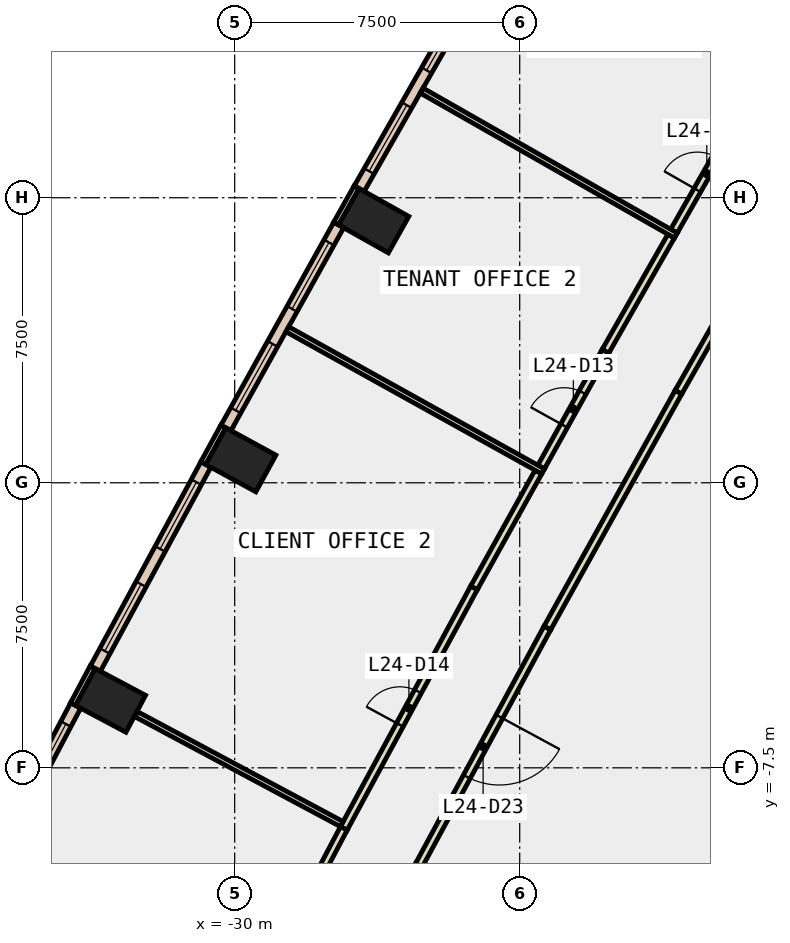
"""IFC4 building model, lengths in metres.
Left out: names, types, materials, properties, quantities, classifications, styles, units other than length and angle.
Written with IfcOpenShell. Run it as: python <this file> out.ifc"""

import sys

from ifc_helpers import new_model, si_unit, direction, frame, frame_2d, origin, origin_2d, place, context, subcontext, project, spatial, rectangle, extrude, element, fill, save


model = new_model("IFC4")
c1 = context("Model", 3, precision=1e-05, world=origin(), true_north=direction((0.0, 1.0)))
c2 = subcontext(c1, "Body", "Model", "MODEL_VIEW")
j1 = project(units=[si_unit("LENGTHUNIT", "METRE"), si_unit("PLANEANGLEUNIT", "RADIAN")], contexts=[c1])
p1 = place(None, origin())
s1 = spatial("IfcSite", under=j1, at=p1, CompositionType="ELEMENT")
p2 = place(p1, origin())
s2 = spatial("IfcBuilding", under=s1, at=p2, CompositionType="ELEMENT")
p3 = place(p2, frame((0.0, 0.0, 111.8)))
s3 = spatial("IfcBuildingStorey", under=s2, at=p3, CompositionType="ELEMENT", Elevation=111.8)
for number, where, z_axis, x_axis in (
    (1, (-26.341, 6.896, -0.4), (0.0, 0.0, 1.0), (0.49, 0.872, 0.0)),
    (2, (-29.838, 0.604, -0.4), (0.0, 0.0, 1.0), (0.48, 0.877, 0.0)),
    (3, (-33.266, -5.726, -0.4), (0.0, 0.0, 1.0), (0.469, 0.883, 0.0)),
):
    element("IfcColumn", number, at=place(p3, frame(where, z_axis=z_axis, x_axis=x_axis)), inside=s3, PredefinedType="COLUMN", context=c2, shape_type="SweptSolid", body=[
        extrude(rectangle(XDim=1.1, YDim=1.5, at=origin_2d()), origin(), (0.0, 0.0, 1.0), 4.2),
    ])
p4 = place(p3, frame((-26.791, 7.78, 0.0), z_axis=(0.0, 0.0, 1.0), x_axis=(-0.490008344094, -0.871717742574, 0.0)))
e4 = element("IfcWall", 4, at=p4, inside=s3, PredefinedType="STANDARD", context=c2, shape_type="SweptSolid", body=[
    extrude(rectangle(XDim=1.1, YDim=0.15, at=frame_2d((0.55, 0.0))), origin(), (0.0, 0.0, 1.0), 3.8),
])
p5 = place(p3, frame((-30.298, 1.483, 0.0), z_axis=(0.0, 0.0, 1.0), x_axis=(-0.479566870346, -0.877505337229, 0.0)))
e5 = element("IfcWall", 5, at=p5, inside=s3, PredefinedType="STANDARD", context=c2, shape_type="SweptSolid", body=[
    extrude(rectangle(XDim=1.101, YDim=0.15, at=frame_2d((0.55, 0.0))), origin(), (0.0, 0.0, 1.0), 3.8),
])
p6 = place(p3, frame((-33.737, -4.854, 0.0), z_axis=(0.0, 0.0, 1.0), x_axis=(-0.46919310775, -0.883095593716, 0.0)))
e6 = element("IfcWall", 6, at=p6, inside=s3, PredefinedType="STANDARD", context=c2, shape_type="SweptSolid", body=[
    extrude(rectangle(XDim=1.099, YDim=0.15, at=frame_2d((0.55, 0.0))), origin(), (0.0, 0.0, 1.0), 3.8),
])
p7 = place(p3, frame((-23.698, 13.048, 0.0), z_axis=(0.0, 0.0, 1.0), x_axis=(-0.495114366991, -0.868827810098, 0.0)))
e7 = element("IfcWall", 7, at=p7, inside=s3, PredefinedType="STANDARD", context=c2, shape_type="SweptSolid", body=[
    extrude(rectangle(XDim=6.11, YDim=0.3, at=frame_2d((3.055, 0.0))), origin(), (0.0, 0.0, 1.0), 3.8),
])
p8 = place(p7, frame((0.527, 0.0, 0.9)))
e8 = element("IfcOpeningElement", 8, at=p8, cuts=e7, PredefinedType="OPENING", context=c2, shape_type="SweptSolid", body=[
    extrude(rectangle(XDim=2.0, YDim=2.6, at=frame_2d((1.0, 1.3))), frame((0.0, 0.16, 0.0), z_axis=(0.0, -1.0, 0.0), x_axis=(1.0, 0.0, 0.0)), (0.0, 0.0, 1.0), 0.32),
])
p9 = place(p7, frame((3.582, 0.0, 0.9)))
e9 = element("IfcOpeningElement", 9, at=p9, cuts=e7, PredefinedType="OPENING", context=c2, shape_type="SweptSolid", body=[
    extrude(rectangle(XDim=2.0, YDim=2.6, at=frame_2d((1.0, 1.3))), frame((0.0, 0.16, 0.0), z_axis=(0.0, -1.0, 0.0), x_axis=(1.0, 0.0, 0.0)), (0.0, 0.0, 1.0), 0.32),
])
p10 = place(p3, frame((-27.262, 6.784, 0.0), z_axis=(0.0, 0.0, 1.0), x_axis=(-0.485822751649, -0.874057351654, 0.0)))
e10 = element("IfcWall", 10, at=p10, inside=s3, PredefinedType="STANDARD", context=c2, shape_type="SweptSolid", body=[
    extrude(rectangle(XDim=6.109, YDim=0.3, at=frame_2d((3.055, 0.0))), origin(), (0.0, 0.0, 1.0), 3.8),
])
p11 = place(p10, frame((0.527, 0.0, 0.9)))
e11 = element("IfcOpeningElement", 11, at=p11, cuts=e10, PredefinedType="OPENING", context=c2, shape_type="SweptSolid", body=[
    extrude(rectangle(XDim=2.0, YDim=2.6, at=frame_2d((1.0, 1.3))), frame((0.0, 0.16, 0.0), z_axis=(0.0, -1.0, 0.0), x_axis=(1.0, 0.0, 0.0)), (0.0, 0.0, 1.0), 0.32),
])
p12 = place(p10, frame((3.582, 0.0, 0.9)))
e12 = element("IfcOpeningElement", 12, at=p12, cuts=e10, PredefinedType="OPENING", context=c2, shape_type="SweptSolid", body=[
    extrude(rectangle(XDim=2.0, YDim=2.6, at=frame_2d((1.0, 1.3))), frame((0.0, 0.16, 0.0), z_axis=(0.0, -1.0, 0.0), x_axis=(1.0, 0.0, 0.0)), (0.0, 0.0, 1.0), 0.32),
])
p13 = place(p3, frame((-30.758, 0.481, 0.0), z_axis=(0.0, 0.0, 1.0), x_axis=(-0.476097776444, -0.879392351152, 0.0)))
e13 = element("IfcWall", 13, at=p13, inside=s3, PredefinedType="STANDARD", context=c2, shape_type="SweptSolid", body=[
    extrude(rectangle(XDim=6.11, YDim=0.3, at=frame_2d((3.055, 0.0))), origin(), (0.0, 0.0, 1.0), 3.8),
])
p14 = place(p13, frame((0.527, 0.0, 0.9)))
e14 = element("IfcOpeningElement", 14, at=p14, cuts=e13, PredefinedType="OPENING", context=c2, shape_type="SweptSolid", body=[
    extrude(rectangle(XDim=2.0, YDim=2.6, at=frame_2d((1.0, 1.3))), frame((0.0, 0.16, 0.0), z_axis=(0.0, -1.0, 0.0), x_axis=(1.0, 0.0, 0.0)), (0.0, 0.0, 1.0), 0.32),
])
p15 = place(p13, frame((3.582, 0.0, 0.9)))
e15 = element("IfcOpeningElement", 15, at=p15, cuts=e13, PredefinedType="OPENING", context=c2, shape_type="SweptSolid", body=[
    extrude(rectangle(XDim=2.0, YDim=2.6, at=frame_2d((1.0, 1.3))), frame((0.0, 0.16, 0.0), z_axis=(0.0, -1.0, 0.0), x_axis=(1.0, 0.0, 0.0)), (0.0, 0.0, 1.0), 0.32),
])
p16 = place(p3, frame((-34.185, -5.86, 0.0), z_axis=(0.0, 0.0, 1.0), x_axis=(-0.466599547852, -0.88446868907, 0.0)))
e16 = element("IfcWall", 16, at=p16, inside=s3, PredefinedType="STANDARD", context=c2, shape_type="SweptSolid", body=[
    extrude(rectangle(XDim=6.202, YDim=0.3, at=frame_2d((3.101, 0.0))), origin(), (0.0, 0.0, 1.0), 3.8),
])
p17 = place(p16, frame((0.551, 0.0, 0.9)))
e17 = element("IfcOpeningElement", 17, at=p17, cuts=e16, PredefinedType="OPENING", context=c2, shape_type="SweptSolid", body=[
    extrude(rectangle(XDim=2.0, YDim=2.6, at=frame_2d((1.0, 1.3))), frame((0.0, 0.16, 0.0), z_axis=(0.0, -1.0, 0.0), x_axis=(1.0, 0.0, 0.0)), (0.0, 0.0, 1.0), 0.32),
])
p18 = place(p16, frame((3.652, 0.0, 0.9)))
e18 = element("IfcOpeningElement", 18, at=p18, cuts=e16, PredefinedType="OPENING", context=c2, shape_type="SweptSolid", body=[
    extrude(rectangle(XDim=2.0, YDim=2.6, at=frame_2d((1.0, 1.3))), frame((0.0, 0.16, 0.0), z_axis=(0.0, -1.0, 0.0), x_axis=(1.0, 0.0, 0.0)), (0.0, 0.0, 1.0), 0.32),
])
p19 = place(p3, frame((-16.783, 5.088, 0.0), z_axis=(0.0, 0.0, 1.0), x_axis=(-0.495023676383, -0.868879485211, 0.0)))
e19 = element("IfcWall", 19, at=p19, inside=s3, PredefinedType="PARTITIONING", context=c2, shape_type="SweptSolid", body=[
    extrude(rectangle(XDim=3.113, YDim=0.2, at=frame_2d((1.557, 0.0))), origin(), (0.0, 0.0, 1.0), 3.8),
])
p20 = place(p3, frame((-18.324, 2.383, 0.0), z_axis=(0.0, 0.0, 1.0), x_axis=(-0.485826874234, -0.874055060206, 0.0)))
e20 = element("IfcWall", 20, at=p20, inside=s3, PredefinedType="PARTITIONING", context=c2, shape_type="SweptSolid", body=[
    extrude(rectangle(XDim=7.099, YDim=0.2, at=frame_2d((3.55, 0.0))), origin(), (0.0, 0.0, 1.0), 3.8),
])
p21 = place(p3, frame((-21.773, -3.822, 0.0), z_axis=(0.0, 0.0, 1.0), x_axis=(-0.476124717613, -0.87937776483, 0.0)))
e21 = element("IfcWall", 21, at=p21, inside=s3, PredefinedType="PARTITIONING", context=c2, shape_type="SweptSolid", body=[
    extrude(rectangle(XDim=7.099, YDim=0.2, at=frame_2d((3.55, 0.0))), origin(), (0.0, 0.0, 1.0), 3.8),
])
p22 = place(p21, frame((2.65, 0.0, 0.0)))
e22 = element("IfcOpeningElement", 22, at=p22, cuts=e21, PredefinedType="OPENING", context=c2, shape_type="SweptSolid", body=[
    extrude(rectangle(XDim=1.8, YDim=2.1, at=frame_2d((0.9, 1.05))), frame((0.0, 0.11, 0.0), z_axis=(0.0, -1.0, 0.0), x_axis=(1.0, 0.0, 0.0)), (0.0, 0.0, 1.0), 0.22),
])
p23 = place(p3, frame((-25.153, -10.065, 0.0), z_axis=(0.0, 0.0, 1.0), x_axis=(-0.466663976618, -0.884434696813, 0.0)))
e23 = element("IfcWall", 23, at=p23, inside=s3, PredefinedType="PARTITIONING", context=c2, shape_type="SweptSolid", body=[
    extrude(rectangle(XDim=6.501, YDim=0.2, at=frame_2d((3.25, 0.0))), origin(), (0.0, 0.0, 1.0), 3.8),
])
p24 = place(p3, frame((-18.441, 6.621, 0.0), z_axis=(0.0, 0.0, 1.0), x_axis=(0.495286549488, 0.868729666753, 0.0)))
e24 = element("IfcWall", 24, at=p24, inside=s3, PredefinedType="PARTITIONING", context=c2, shape_type="SweptSolid", body=[
    extrude(rectangle(XDim=3.487, YDim=0.2, at=frame_2d((1.743, 0.0))), origin(), (0.0, 0.0, 1.0), 3.8),
])
p25 = place(p24, frame((1.243, 0.0, 0.0)))
e25 = element("IfcOpeningElement", 25, at=p25, cuts=e24, PredefinedType="OPENING", context=c2, shape_type="SweptSolid", body=[
    extrude(rectangle(XDim=1.0, YDim=2.1, at=frame_2d((0.5, 1.05))), frame((0.0, 0.11, 0.0), z_axis=(0.0, -1.0, 0.0), x_axis=(1.0, 0.0, 0.0)), (0.0, 0.0, 1.0), 0.22),
])
p26 = place(p3, frame((-21.936, 0.414, 0.0), z_axis=(0.0, 0.0, 1.0), x_axis=(0.485827202541, 0.874054877723, 0.0)))
e26 = element("IfcWall", 26, at=p26, inside=s3, PredefinedType="PARTITIONING", context=c2, shape_type="SweptSolid", body=[
    extrude(rectangle(XDim=3.487, YDim=0.2, at=frame_2d((1.744, 0.0))), origin(), (0.0, 0.0, 1.0), 3.8),
])
p27 = place(p26, frame((1.244, 0.0, 0.0)))
e27 = element("IfcOpeningElement", 27, at=p27, cuts=e26, PredefinedType="OPENING", context=c2, shape_type="SweptSolid", body=[
    extrude(rectangle(XDim=1.0, YDim=2.1, at=frame_2d((0.5, 1.05))), frame((0.0, 0.11, 0.0), z_axis=(0.0, -1.0, 0.0), x_axis=(1.0, 0.0, 0.0)), (0.0, 0.0, 1.0), 0.22),
])
p28 = place(p3, frame((-20.242, 3.462, 0.0), z_axis=(0.0, 0.0, 1.0), x_axis=(0.495309264725, 0.868716715781, 0.0)))
e28 = element("IfcWall", 28, at=p28, inside=s3, PredefinedType="PARTITIONING", context=c2, shape_type="SweptSolid", body=[
    extrude(rectangle(XDim=3.487, YDim=0.2, at=frame_2d((1.743, 0.0))), origin(), (0.0, 0.0, 1.0), 3.8),
])
p29 = place(p3, frame((-27.129, -9.094, 0.0), z_axis=(0.0, 0.0, 1.0), x_axis=(0.476090835435, 0.879396108938, 0.0)))
e29 = element("IfcWall", 29, at=p29, inside=s3, PredefinedType="PARTITIONING", context=c2, shape_type="SweptSolid", body=[
    extrude(rectangle(XDim=7.198, YDim=0.2, at=frame_2d((3.599, 0.0))), origin(), (0.0, 0.0, 1.0), 3.8),
])
p30 = place(p29, frame((3.099, 0.0, 0.0)))
e30 = element("IfcOpeningElement", 30, at=p30, cuts=e29, PredefinedType="OPENING", context=c2, shape_type="SweptSolid", body=[
    extrude(rectangle(XDim=1.0, YDim=2.1, at=frame_2d((0.5, 1.05))), frame((0.0, 0.11, 0.0), z_axis=(0.0, -1.0, 0.0), x_axis=(1.0, 0.0, 0.0)), (0.0, 0.0, 1.0), 0.22),
])
p31 = place(p3, frame((-23.702, -2.764, 0.0), z_axis=(0.0, 0.0, 1.0), x_axis=(0.485892653581, 0.874018494767, 0.0)))
e31 = element("IfcWall", 31, at=p31, inside=s3, PredefinedType="PARTITIONING", context=c2, shape_type="SweptSolid", body=[
    extrude(rectangle(XDim=3.486, YDim=0.2, at=frame_2d((1.743, 0.0))), origin(), (0.0, 0.0, 1.0), 3.8),
])
p32 = place(p3, frame((-30.221, -14.956, 0.0), z_axis=(0.0, 0.0, 1.0), x_axis=(0.466543318111, 0.884498350663, 0.0)))
e32 = element("IfcWall", 32, at=p32, inside=s3, PredefinedType="PARTITIONING", context=c2, shape_type="SweptSolid", body=[
    extrude(rectangle(XDim=6.627, YDim=0.2, at=frame_2d((3.314, 0.0))), origin(), (0.0, 0.0, 1.0), 3.8),
])
p33 = place(p32, frame((2.889, 0.0, 0.0)))
e33 = element("IfcOpeningElement", 33, at=p33, cuts=e32, PredefinedType="OPENING", context=c2, shape_type="SweptSolid", body=[
    extrude(rectangle(XDim=1.0, YDim=2.1, at=frame_2d((0.5, 1.05))), frame((0.0, 0.11, 0.0), z_axis=(0.0, -1.0, 0.0), x_axis=(1.0, 0.0, 0.0)), (0.0, 0.0, 1.0), 0.22),
])
p34 = place(p3, frame((-18.391, 6.506, 0.0), z_axis=(0.0, 0.0, 1.0), x_axis=(-0.868738258528, 0.495271479261, 0.0)))
e34 = element("IfcWall", 34, at=p34, inside=s3, PredefinedType="PARTITIONING", context=c2, shape_type="SweptSolid", body=[
    extrude(rectangle(XDim=7.701, YDim=0.15, at=frame_2d((3.85, 0.0))), origin(), (0.0, 0.0, 1.0), 3.8),
])
p35 = place(p3, frame((-21.885, 0.3, 0.0), z_axis=(0.0, 0.0, 1.0), x_axis=(-0.874095944746, 0.485753311237, 0.0)))
e35 = element("IfcWall", 35, at=p35, inside=s3, PredefinedType="PARTITIONING", context=c2, shape_type="SweptSolid", body=[
    extrude(rectangle(XDim=7.699, YDim=0.15, at=frame_2d((3.85, 0.0))), origin(), (0.0, 0.0, 1.0), 3.8),
])
p36 = place(p3, frame((-27.182, -8.981, 0.0), z_axis=(0.0, 0.0, 1.0), x_axis=(-0.881899408669, 0.471437623647, 0.0)))
e36 = element("IfcWall", 36, at=p36, inside=s3, PredefinedType="PARTITIONING", context=c2, shape_type="SweptSolid", body=[
    extrude(rectangle(XDim=6.13, YDim=0.15, at=frame_2d((3.065, 0.0))), origin(), (0.0, 0.0, 1.0), 3.8),
])
p37 = place(p8, origin())
e37 = element("IfcWindow", 37, at=p37, inside=s3, PartitioningType="SINGLE_PANEL", PredefinedType="WINDOW", context=c2, shape_type="SweptSolid", body=[
    extrude(rectangle(XDim=2.0, YDim=2.6, at=frame_2d((1.0, 1.3))), frame((0.0, 0.03, 0.0), z_axis=(0.0, -1.0, 0.0), x_axis=(1.0, 0.0, 0.0)), (0.0, 0.0, 1.0), 0.06),
])
fill(e8, e37)
p38 = place(p9, origin())
e38 = element("IfcWindow", 38, at=p38, inside=s3, PartitioningType="SINGLE_PANEL", PredefinedType="WINDOW", context=c2, shape_type="SweptSolid", body=[
    extrude(rectangle(XDim=2.0, YDim=2.6, at=frame_2d((1.0, 1.3))), frame((0.0, 0.03, 0.0), z_axis=(0.0, -1.0, 0.0), x_axis=(1.0, 0.0, 0.0)), (0.0, 0.0, 1.0), 0.06),
])
fill(e9, e38)
p39 = place(p11, origin())
e39 = element("IfcWindow", 39, at=p39, inside=s3, PartitioningType="SINGLE_PANEL", PredefinedType="WINDOW", context=c2, shape_type="SweptSolid", body=[
    extrude(rectangle(XDim=2.0, YDim=2.6, at=frame_2d((1.0, 1.3))), frame((0.0, 0.03, 0.0), z_axis=(0.0, -1.0, 0.0), x_axis=(1.0, 0.0, 0.0)), (0.0, 0.0, 1.0), 0.06),
])
fill(e11, e39)
p40 = place(p12, origin())
e40 = element("IfcWindow", 40, at=p40, inside=s3, PartitioningType="SINGLE_PANEL", PredefinedType="WINDOW", context=c2, shape_type="SweptSolid", body=[
    extrude(rectangle(XDim=2.0, YDim=2.6, at=frame_2d((1.0, 1.3))), frame((0.0, 0.03, 0.0), z_axis=(0.0, -1.0, 0.0), x_axis=(1.0, 0.0, 0.0)), (0.0, 0.0, 1.0), 0.06),
])
fill(e12, e40)
p41 = place(p14, origin())
e41 = element("IfcWindow", 41, at=p41, inside=s3, PartitioningType="SINGLE_PANEL", PredefinedType="WINDOW", context=c2, shape_type="SweptSolid", body=[
    extrude(rectangle(XDim=2.0, YDim=2.6, at=frame_2d((1.0, 1.3))), frame((0.0, 0.03, 0.0), z_axis=(0.0, -1.0, 0.0), x_axis=(1.0, 0.0, 0.0)), (0.0, 0.0, 1.0), 0.06),
])
fill(e14, e41)
p42 = place(p15, origin())
e42 = element("IfcWindow", 42, at=p42, inside=s3, PartitioningType="SINGLE_PANEL", PredefinedType="WINDOW", context=c2, shape_type="SweptSolid", body=[
    extrude(rectangle(XDim=2.0, YDim=2.6, at=frame_2d((1.0, 1.3))), frame((0.0, 0.03, 0.0), z_axis=(0.0, -1.0, 0.0), x_axis=(1.0, 0.0, 0.0)), (0.0, 0.0, 1.0), 0.06),
])
fill(e15, e42)
p43 = place(p17, origin())
e43 = element("IfcWindow", 43, at=p43, inside=s3, PartitioningType="SINGLE_PANEL", PredefinedType="WINDOW", context=c2, shape_type="SweptSolid", body=[
    extrude(rectangle(XDim=2.0, YDim=2.6, at=frame_2d((1.0, 1.3))), frame((0.0, 0.03, 0.0), z_axis=(0.0, -1.0, 0.0), x_axis=(1.0, 0.0, 0.0)), (0.0, 0.0, 1.0), 0.06),
])
fill(e17, e43)
p44 = place(p25, origin())
e44 = element("IfcDoor", 44, at=p44, inside=s3, OperationType="SINGLE_SWING_RIGHT", PredefinedType="DOOR", context=c2, shape_type="SweptSolid", body=[
    extrude(rectangle(XDim=1.0, YDim=2.1, at=frame_2d((0.5, 1.05))), frame((0.0, 0.025, 0.0), z_axis=(0.0, -1.0, 0.0), x_axis=(1.0, 0.0, 0.0)), (0.0, 0.0, 1.0), 0.05),
])
fill(e25, e44)
p45 = place(p27, origin())
e45 = element("IfcDoor", 45, at=p45, inside=s3, OperationType="SINGLE_SWING_RIGHT", PredefinedType="DOOR", context=c2, shape_type="SweptSolid", body=[
    extrude(rectangle(XDim=1.0, YDim=2.1, at=frame_2d((0.5, 1.05))), frame((0.0, 0.025, 0.0), z_axis=(0.0, -1.0, 0.0), x_axis=(1.0, 0.0, 0.0)), (0.0, 0.0, 1.0), 0.05),
])
fill(e27, e45)
p46 = place(p30, origin())
e46 = element("IfcDoor", 46, at=p46, inside=s3, OperationType="SINGLE_SWING_RIGHT", PredefinedType="DOOR", context=c2, shape_type="SweptSolid", body=[
    extrude(rectangle(XDim=1.0, YDim=2.1, at=frame_2d((0.5, 1.05))), frame((0.0, 0.025, 0.0), z_axis=(0.0, -1.0, 0.0), x_axis=(1.0, 0.0, 0.0)), (0.0, 0.0, 1.0), 0.05),
])
fill(e30, e46)
p47 = place(p22, origin())
e47 = element("IfcDoor", 47, at=p47, inside=s3, OperationType="DOUBLE_DOOR_SINGLE_SWING", PredefinedType="DOOR", context=c2, shape_type="SweptSolid", body=[
    extrude(rectangle(XDim=1.8, YDim=2.1, at=frame_2d((0.9, 1.05))), frame((0.0, 0.025, 0.0), z_axis=(0.0, -1.0, 0.0), x_axis=(1.0, 0.0, 0.0)), (0.0, 0.0, 1.0), 0.05),
])
fill(e22, e47)
save(model, sys.argv[1])
